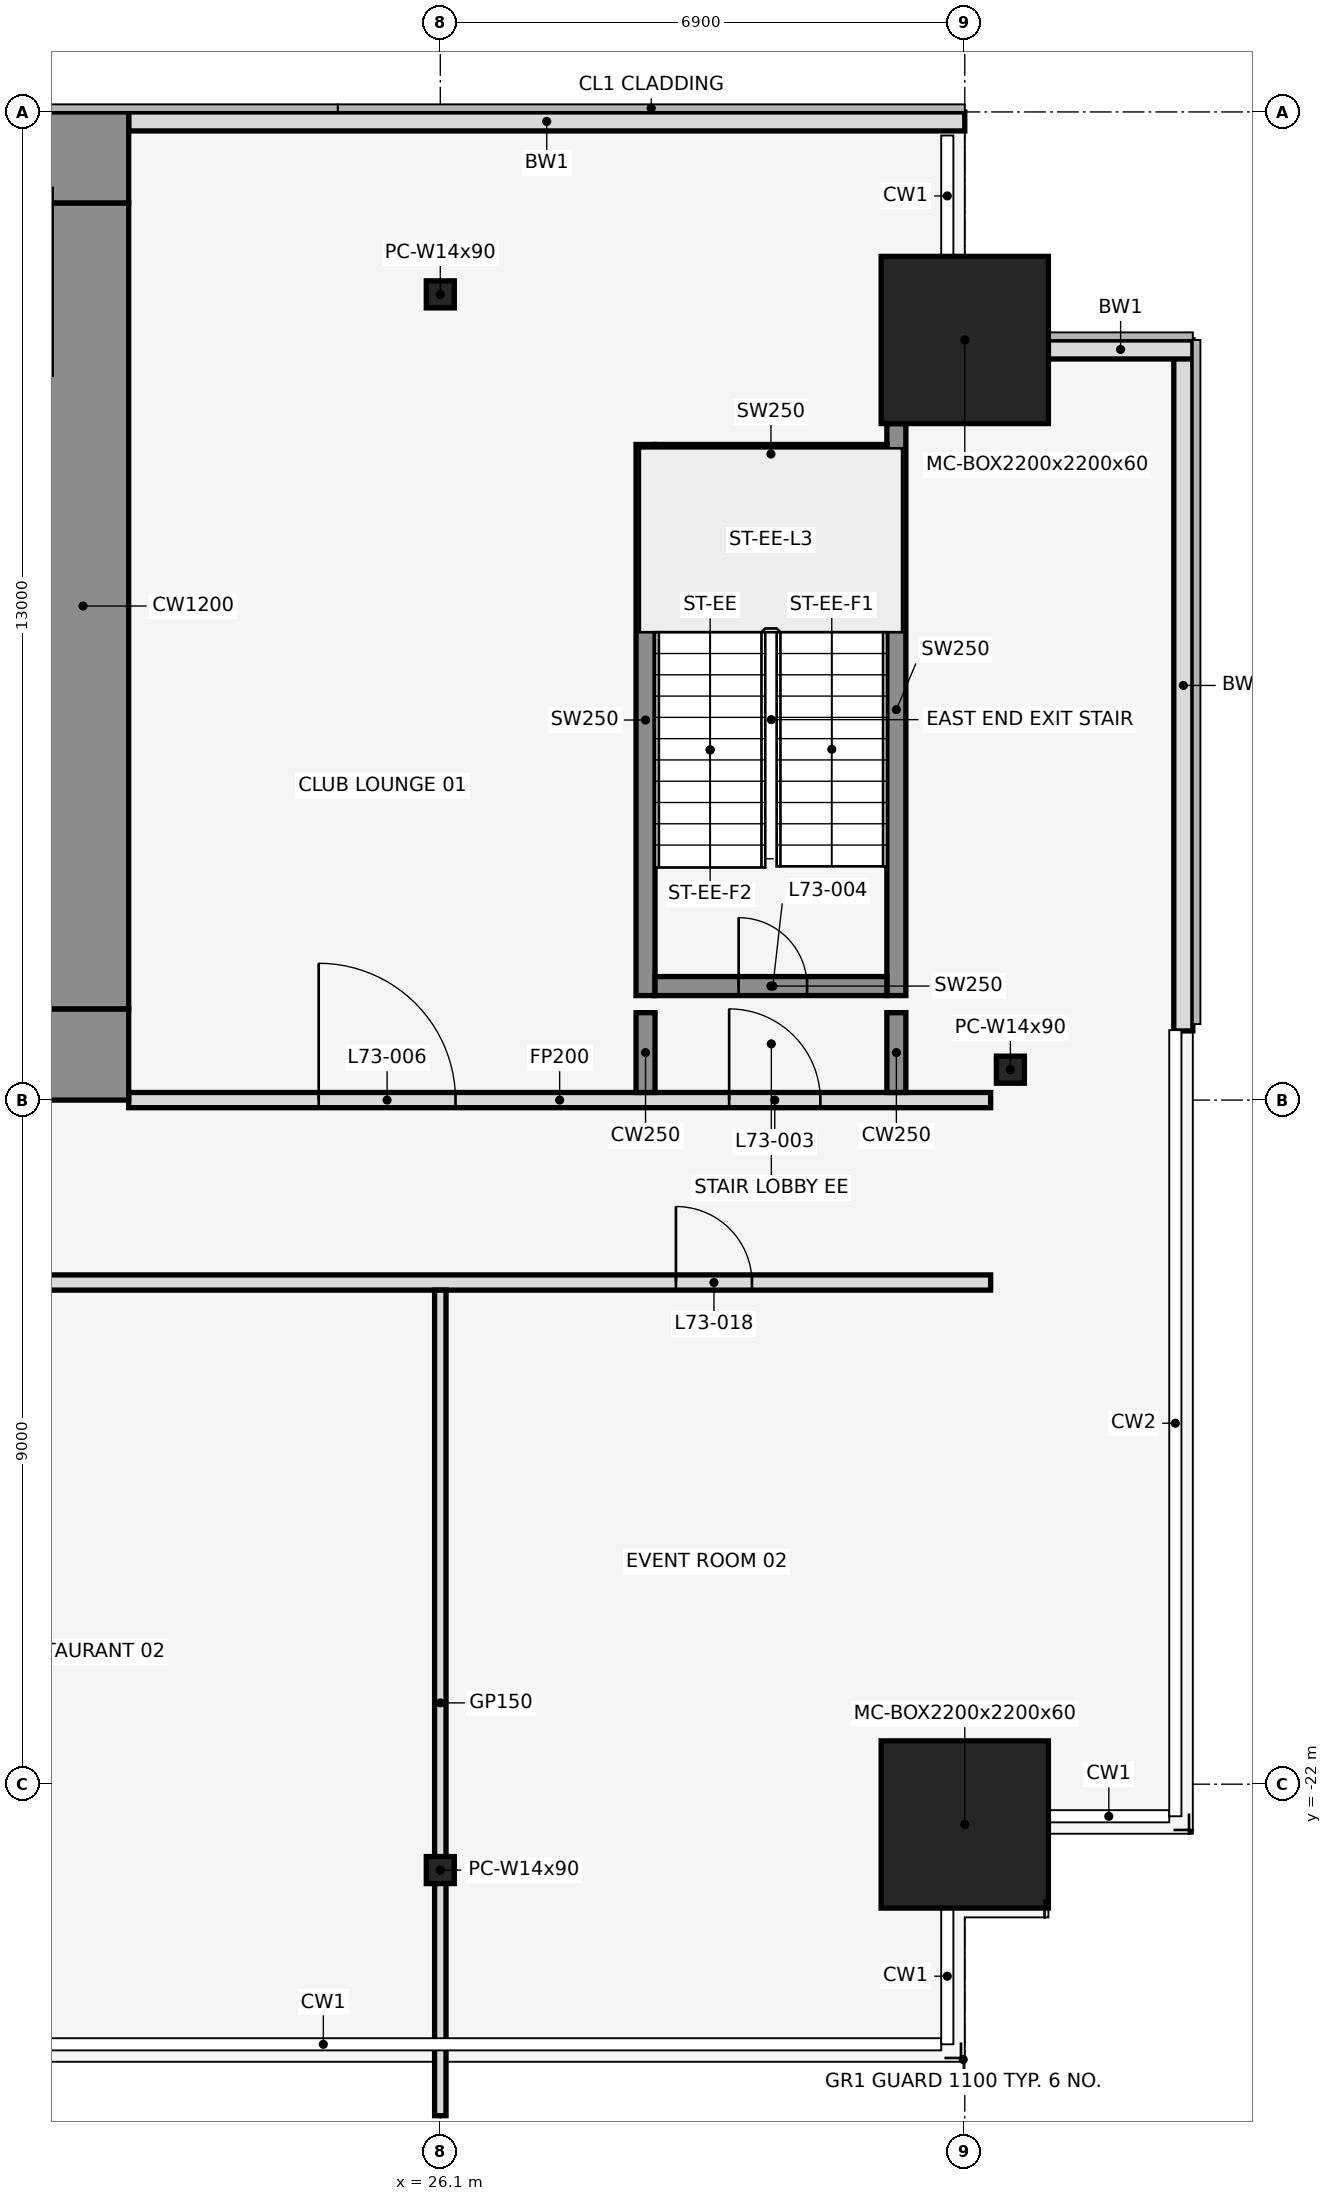
"""IFC4 building model, lengths in metres.
Left out: names, types, materials, properties, quantities, classifications, styles, units other than length and angle.
Written with IfcOpenShell. Run it as: python <this file> out.ifc"""

import sys

from ifc_helpers import new_model, si_unit, direction, frame, frame_2d, origin, origin_2d, place, context, subcontext, project, spatial, rectangle, hollow_rectangle, i_section, extrude, element, fill, save


model = new_model("IFC4")
c1 = context("Model", 3, precision=1e-05, world=origin(), true_north=direction((0.0, 1.0)))
c2 = subcontext(c1, "Body", "Model", "MODEL_VIEW")
j1 = project(units=[si_unit("LENGTHUNIT", "METRE"), si_unit("PLANEANGLEUNIT", "RADIAN")], contexts=[c1])
p1 = place(None, origin())
s1 = spatial("IfcSite", under=j1, at=p1, CompositionType="ELEMENT")
p2 = place(p1, origin())
s2 = spatial("IfcBuilding", under=s1, at=p2, CompositionType="ELEMENT")
p3 = place(p2, frame((0.0, 0.0, 324.5)))
s3 = spatial("IfcBuildingStorey", under=s2, at=p3, CompositionType="ELEMENT", Elevation=324.5)
for number, where, z_axis, x_axis in (
    (1, (26.1, -23.13, 0.0), (0.0, 0.0, 1.0), (1.0, 0.0, 0.0)),
    (2, (26.1, -2.4, 0.0), (0.0, 0.0, 1.0), (1.0, 0.0, 0.0)),
):
    element("IfcColumn", number, at=place(p3, frame(where, z_axis=z_axis, x_axis=x_axis)), inside=s3, PredefinedType="COLUMN", context=c2, shape_type="SweptSolid", body=[
        extrude(i_section(OverallWidth=0.368, OverallDepth=0.356, WebThickness=0.011, FlangeThickness=0.018, at=origin_2d()), origin(), (0.0, 0.0, 1.0), 4.5),
    ])
for number, where, z_axis, x_axis in (
    (3, (33.0, -22.53, 0.0), (0.0, 0.0, 1.0), (1.0, 0.0, 0.0)),
    (4, (33.0, -3.0, 0.0), (0.0, 0.0, 1.0), (1.0, 0.0, 0.0)),
):
    element("IfcColumn", number, at=place(p3, frame(where, z_axis=z_axis, x_axis=x_axis)), inside=s3, PredefinedType="COLUMN", context=c2, shape_type="SweptSolid", body=[
        extrude(hollow_rectangle(XDim=2.2, YDim=2.2, WallThickness=0.06, at=origin_2d()), origin(), (0.0, 0.0, 1.0), 4.5),
    ])
p4 = place(p3, frame((33.6, -12.6, 0.0), z_axis=(0.0, 0.0, 1.0), x_axis=(1.0, 0.0, 0.0)))
e5 = element("IfcColumn", 5, at=p4, inside=s3, PredefinedType="COLUMN", context=c2, shape_type="SweptSolid", body=[
    extrude(i_section(OverallWidth=0.368, OverallDepth=0.356, WebThickness=0.011, FlangeThickness=0.018, at=origin_2d()), origin(), (0.0, 0.0, 1.0), 4.5),
])
p5 = place(p3, frame((33.0, -0.125, 0.0), z_axis=(0.0, 0.0, 1.0), x_axis=(-1.0, 0.0, 0.0)))
e6 = element("IfcWall", 6, at=p5, inside=s3, PredefinedType="STANDARD", context=c2, shape_type="SweptSolid", body=[
    extrude(rectangle(XDim=11.0, YDim=0.25, at=frame_2d((5.5, 0.0))), origin(), (0.0, 0.0, 1.0), 4.35),
])
p6 = place(p3, frame((35.875, -12.09, 0.0), z_axis=(0.0, 0.0, 1.0), x_axis=(0.0, 1.0, 0.0)))
e7 = element("IfcWall", 7, at=p6, inside=s3, PredefinedType="STANDARD", context=c2, shape_type="SweptSolid", body=[
    extrude(rectangle(XDim=9.09, YDim=0.25, at=frame_2d((4.545, 0.0))), origin(), (0.0, 0.0, 1.0), 4.35),
])
p7 = place(p3, frame((36.0, -3.125, 0.0), z_axis=(0.0, 0.0, 1.0), x_axis=(-1.0, 0.0, 0.0)))
e8 = element("IfcWall", 8, at=p7, inside=s3, PredefinedType="STANDARD", context=c2, shape_type="SweptSolid", body=[
    extrude(rectangle(XDim=1.9, YDim=0.25, at=frame_2d((0.95, 0.0))), origin(), (0.0, 0.0, 1.0), 4.35),
])
p8 = place(p3, frame((28.8, -11.625, 0.0), z_axis=(0.0, 0.0, 1.0), x_axis=(0.0, 1.0, 0.0)))
e9 = element("IfcWall", 9, at=p8, inside=s3, PredefinedType="SHEAR", context=c2, shape_type="SweptSolid", body=[
    extrude(rectangle(XDim=7.25, YDim=0.25, at=frame_2d((3.625, 0.0))), origin(), (0.0, 0.0, 1.0), 4.5),
])
p9 = place(p3, frame((32.1, -11.625, 0.0), z_axis=(0.0, 0.0, 1.0), x_axis=(0.0, 1.0, 0.0)))
e10 = element("IfcWall", 10, at=p9, inside=s3, PredefinedType="SHEAR", context=c2, shape_type="SweptSolid", body=[
    extrude(rectangle(XDim=7.525, YDim=0.25, at=frame_2d((3.762, 0.0))), origin(), (0.0, 0.0, 1.0), 4.5),
])
p10 = place(p3, frame((28.925, -11.5, 0.0), z_axis=(0.0, 0.0, 1.0), x_axis=(1.0, 0.0, 0.0)))
e11 = element("IfcWall", 11, at=p10, inside=s3, PredefinedType="SHEAR", context=c2, shape_type="SweptSolid", body=[
    extrude(rectangle(XDim=3.05, YDim=0.25, at=frame_2d((1.525, 0.0))), origin(), (0.0, 0.0, 1.0), 4.5),
])
p11 = place(p10, frame((1.1, 0.0, 0.0)))
e12 = element("IfcOpeningElement", 12, at=p11, cuts=e11, PredefinedType="OPENING", context=c2, shape_type="SweptSolid", body=[
    extrude(rectangle(XDim=0.9, YDim=2.1, at=frame_2d((0.45, 1.05))), frame((0.0, 0.137, 0.0), z_axis=(0.0, -1.0, 0.0), x_axis=(1.0, 0.0, 0.0)), (0.0, 0.0, 1.0), 0.274),
])
p12 = place(p3, frame((28.925, -4.5, 0.0), z_axis=(0.0, 0.0, 1.0), x_axis=(1.0, 0.0, 0.0)))
e13 = element("IfcWall", 13, at=p12, inside=s3, PredefinedType="SHEAR", context=c2, shape_type="SweptSolid", body=[
    extrude(rectangle(XDim=3.05, YDim=0.25, at=frame_2d((1.525, 0.0))), origin(), (0.0, 0.0, 1.0), 4.5),
])
p13 = place(p3, frame((1.4, -15.4, 0.0), z_axis=(0.0, 0.0, 1.0), x_axis=(1.0, 0.0, 0.0)))
e14 = element("IfcWall", 14, at=p13, inside=s3, PredefinedType="PARTITIONING", context=c2, shape_type="SweptSolid", body=[
    extrude(rectangle(XDim=31.94, YDim=0.2, at=frame_2d((15.97, 0.0))), origin(), (0.0, 0.0, 1.0), 3.418),
])
p14 = place(p13, frame((3.2, 0.0, 0.0)))
e15 = element("IfcOpeningElement", 15, at=p14, cuts=e14, PredefinedType="OPENING", context=c2, shape_type="SweptSolid", body=[
    extrude(rectangle(XDim=1.0, YDim=2.1, at=frame_2d((0.5, 1.05))), frame((0.0, 0.112, 0.0), z_axis=(0.0, -1.0, 0.0), x_axis=(1.0, 0.0, 0.0)), (0.0, 0.0, 1.0), 0.224),
])
p15 = place(p13, frame((9.7, 0.0, 0.0)))
e16 = element("IfcOpeningElement", 16, at=p15, cuts=e14, PredefinedType="OPENING", context=c2, shape_type="SweptSolid", body=[
    extrude(rectangle(XDim=1.0, YDim=2.1, at=frame_2d((0.5, 1.05))), frame((0.0, 0.112, 0.0), z_axis=(0.0, -1.0, 0.0), x_axis=(1.0, 0.0, 0.0)), (0.0, 0.0, 1.0), 0.224),
])
p16 = place(p13, frame((18.4, 0.0, 0.0)))
e17 = element("IfcOpeningElement", 17, at=p16, cuts=e14, PredefinedType="OPENING", context=c2, shape_type="SweptSolid", body=[
    extrude(rectangle(XDim=1.0, YDim=2.1, at=frame_2d((0.5, 1.05))), frame((0.0, 0.112, 0.0), z_axis=(0.0, -1.0, 0.0), x_axis=(1.0, 0.0, 0.0)), (0.0, 0.0, 1.0), 0.224),
])
p17 = place(p13, frame((27.8, 0.0, 0.0)))
e18 = element("IfcOpeningElement", 18, at=p17, cuts=e14, PredefinedType="OPENING", context=c2, shape_type="SweptSolid", body=[
    extrude(rectangle(XDim=1.0, YDim=2.1, at=frame_2d((0.5, 1.05))), frame((0.0, 0.112, 0.0), z_axis=(0.0, -1.0, 0.0), x_axis=(1.0, 0.0, 0.0)), (0.0, 0.0, 1.0), 0.224),
])
p18 = place(p3, frame((22.0, -13.0, 0.0), z_axis=(0.0, 0.0, 1.0), x_axis=(1.0, 0.0, 0.0)))
e19 = element("IfcWall", 19, at=p18, inside=s3, PredefinedType="PARTITIONING", context=c2, shape_type="SweptSolid", body=[
    extrude(rectangle(XDim=11.34, YDim=0.2, at=frame_2d((5.67, 0.0))), origin(), (0.0, 0.0, 1.0), 3.418),
])
p19 = place(p18, frame((7.9, 0.0, 0.0)))
e20 = element("IfcOpeningElement", 20, at=p19, cuts=e19, PredefinedType="OPENING", context=c2, shape_type="SweptSolid", body=[
    extrude(rectangle(XDim=1.2, YDim=2.1, at=frame_2d((0.6, 1.05))), frame((0.0, 0.112, 0.0), z_axis=(0.0, -1.0, 0.0), x_axis=(1.0, 0.0, 0.0)), (0.0, 0.0, 1.0), 0.224),
])
p20 = place(p18, frame((2.5, 0.0, 0.0)))
e21 = element("IfcOpeningElement", 21, at=p20, cuts=e19, PredefinedType="OPENING", context=c2, shape_type="SweptSolid", body=[
    extrude(rectangle(XDim=1.8, YDim=2.1, at=frame_2d((0.9, 1.05))), frame((0.0, 0.112, 0.0), z_axis=(0.0, -1.0, 0.0), x_axis=(1.0, 0.0, 0.0)), (0.0, 0.0, 1.0), 0.224),
])
p21 = place(p3, frame((26.1, -26.361, 0.0), z_axis=(0.0, 0.0, 1.0), x_axis=(0.0, 1.0, 0.0)))
e22 = element("IfcWall", 22, at=p21, inside=s3, PredefinedType="PARTITIONING", context=c2, shape_type="SweptSolid", body=[
    extrude(rectangle(XDim=10.861, YDim=0.15, at=frame_2d((5.431, 0.0))), origin(), (0.0, 0.0, 1.0), 3.418),
])
for number, where, z_axis, x_axis in (
    (23, (28.8, -12.9, 0.0), (0.0, 0.0, 1.0), (0.0, 1.0, 0.0)),
    (24, (32.1, -12.9, 0.0), (0.0, 0.0, 1.0), (0.0, 1.0, 0.0)),
):
    element("IfcWall", number, at=place(p3, frame(where, z_axis=z_axis, x_axis=x_axis)), inside=s3, PredefinedType="SHEAR", context=c2, shape_type="SweptSolid", body=[
        extrude(rectangle(XDim=1.05, YDim=0.25, at=frame_2d((0.525, 0.0))), origin(), (0.0, 0.0, 1.0), 4.5),
    ])
p22 = place(p3, frame((-22.0, -0.6, 0.0), z_axis=(0.0, 0.0, 1.0), x_axis=(1.0, 0.0, 0.0)))
e25 = element("IfcWall", 25, at=p22, inside=s3, PredefinedType="SHEAR", context=c2, shape_type="SweptSolid", body=[
    extrude(rectangle(XDim=44.0, YDim=1.2, at=frame_2d((22.0, 0.0))), origin(), (0.0, 0.0, 1.0), 4.5),
])
p23 = place(p22, frame((18.55, 0.0, 0.0)))
e26 = element("IfcOpeningElement", 26, at=p23, cuts=e25, PredefinedType="OPENING", context=c2, shape_type="SweptSolid", body=[
    extrude(rectangle(XDim=0.9, YDim=2.1, at=frame_2d((0.45, 1.05))), frame((0.0, 0.612, 0.0), z_axis=(0.0, -1.0, 0.0), x_axis=(1.0, 0.0, 0.0)), (0.0, 0.0, 1.0), 1.224),
])
p24 = place(p22, frame((24.55, 0.0, 0.0)))
e27 = element("IfcOpeningElement", 27, at=p24, cuts=e25, PredefinedType="OPENING", context=c2, shape_type="SweptSolid", body=[
    extrude(rectangle(XDim=0.9, YDim=2.1, at=frame_2d((0.45, 1.05))), frame((0.0, 0.612, 0.0), z_axis=(0.0, -1.0, 0.0), x_axis=(1.0, 0.0, 0.0)), (0.0, 0.0, 1.0), 1.224),
])
p25 = place(p3, frame((-22.0, -12.4, 0.0), z_axis=(0.0, 0.0, 1.0), x_axis=(1.0, 0.0, 0.0)))
e28 = element("IfcWall", 28, at=p25, inside=s3, PredefinedType="SHEAR", context=c2, shape_type="SweptSolid", body=[
    extrude(rectangle(XDim=44.0, YDim=1.2, at=frame_2d((22.0, 0.0))), origin(), (0.0, 0.0, 1.0), 4.5),
])
p26 = place(p25, frame((2.2, 0.0, 0.0)))
e29 = element("IfcOpeningElement", 29, at=p26, cuts=e28, PredefinedType="OPENING", context=c2, shape_type="SweptSolid", body=[
    extrude(rectangle(XDim=1.2, YDim=2.1, at=frame_2d((0.6, 1.05))), frame((0.0, 0.612, 0.0), z_axis=(0.0, -1.0, 0.0), x_axis=(1.0, 0.0, 0.0)), (0.0, 0.0, 1.0), 1.224),
])
p27 = place(p25, frame((21.4, 0.0, 0.0)))
e30 = element("IfcOpeningElement", 30, at=p27, cuts=e28, PredefinedType="OPENING", context=c2, shape_type="SweptSolid", body=[
    extrude(rectangle(XDim=1.2, YDim=2.1, at=frame_2d((0.6, 1.05))), frame((0.0, 0.612, 0.0), z_axis=(0.0, -1.0, 0.0), x_axis=(1.0, 0.0, 0.0)), (0.0, 0.0, 1.0), 1.224),
])
p28 = place(p25, frame((40.6, 0.0, 0.0)))
e31 = element("IfcOpeningElement", 31, at=p28, cuts=e28, PredefinedType="OPENING", context=c2, shape_type="SweptSolid", body=[
    extrude(rectangle(XDim=1.2, YDim=2.1, at=frame_2d((0.6, 1.05))), frame((0.0, 0.612, 0.0), z_axis=(0.0, -1.0, 0.0), x_axis=(1.0, 0.0, 0.0)), (0.0, 0.0, 1.0), 1.224),
])
p29 = place(p25, frame((16.0, 0.0, 0.0)))
e32 = element("IfcOpeningElement", 32, at=p29, cuts=e28, PredefinedType="OPENING", context=c2, shape_type="SweptSolid", body=[
    extrude(rectangle(XDim=1.8, YDim=2.1, at=frame_2d((0.9, 1.05))), frame((0.0, 0.612, 0.0), z_axis=(0.0, -1.0, 0.0), x_axis=(1.0, 0.0, 0.0)), (0.0, 0.0, 1.0), 1.224),
])
p30 = place(p25, frame((6.3, 0.0, 0.0)))
e33 = element("IfcOpeningElement", 33, at=p30, cuts=e28, PredefinedType="OPENING", context=c2, shape_type="SweptSolid", body=[
    extrude(rectangle(XDim=1.2, YDim=2.1, at=frame_2d((0.6, 1.05))), frame((0.0, 0.612, 0.0), z_axis=(0.0, -1.0, 0.0), x_axis=(1.0, 0.0, 0.0)), (0.0, 0.0, 1.0), 1.224),
])
p31 = place(p25, frame((26.2, 0.0, 0.0)))
e34 = element("IfcOpeningElement", 34, at=p31, cuts=e28, PredefinedType="OPENING", context=c2, shape_type="SweptSolid", body=[
    extrude(rectangle(XDim=1.8, YDim=2.1, at=frame_2d((0.9, 1.05))), frame((0.0, 0.612, 0.0), z_axis=(0.0, -1.0, 0.0), x_axis=(1.0, 0.0, 0.0)), (0.0, 0.0, 1.0), 1.224),
])
p32 = place(p25, frame((36.5, 0.0, 0.0)))
e35 = element("IfcOpeningElement", 35, at=p32, cuts=e28, PredefinedType="OPENING", context=c2, shape_type="SweptSolid", body=[
    extrude(rectangle(XDim=1.2, YDim=2.1, at=frame_2d((0.6, 1.05))), frame((0.0, 0.612, 0.0), z_axis=(0.0, -1.0, 0.0), x_axis=(1.0, 0.0, 0.0)), (0.0, 0.0, 1.0), 1.224),
])
p33 = place(p3, frame((21.4, -11.8, 0.0), z_axis=(0.0, 0.0, 1.0), x_axis=(0.0, 1.0, 0.0)))
e36 = element("IfcWall", 36, at=p33, inside=s3, PredefinedType="SHEAR", context=c2, shape_type="SweptSolid", body=[
    extrude(rectangle(XDim=10.6, YDim=1.2, at=frame_2d((5.3, 0.0))), origin(), (0.0, 0.0, 1.0), 4.5),
])
p34 = place(p19, origin())
e37 = element("IfcDoor", 37, at=p34, inside=s3, OperationType="SINGLE_SWING_RIGHT", PredefinedType="DOOR", context=c2, shape_type="SweptSolid", body=[
    extrude(rectangle(XDim=1.2, YDim=2.1, at=frame_2d((0.6, 1.05))), frame((0.0, 0.025, 0.0), z_axis=(0.0, -1.0, 0.0), x_axis=(1.0, 0.0, 0.0)), (0.0, 0.0, 1.0), 0.05),
])
fill(e20, e37)
p35 = place(p11, origin())
e38 = element("IfcDoor", 38, at=p35, inside=s3, OperationType="SINGLE_SWING_LEFT", PredefinedType="DOOR", context=c2, shape_type="SweptSolid", body=[
    extrude(rectangle(XDim=0.9, YDim=2.1, at=frame_2d((0.45, 1.05))), frame((0.0, 0.025, 0.0), z_axis=(0.0, -1.0, 0.0), x_axis=(1.0, 0.0, 0.0)), (0.0, 0.0, 1.0), 0.05),
])
fill(e12, e38)
p36 = place(p20, origin())
e39 = element("IfcDoor", 39, at=p36, inside=s3, OperationType="SINGLE_SWING_LEFT", PredefinedType="DOOR", context=c2, shape_type="SweptSolid", body=[
    extrude(rectangle(XDim=1.8, YDim=2.1, at=frame_2d((0.9, 1.05))), frame((0.0, 0.025, 0.0), z_axis=(0.0, -1.0, 0.0), x_axis=(1.0, 0.0, 0.0)), (0.0, 0.0, 1.0), 0.05),
])
fill(e21, e39)
p37 = place(p17, frame((1.0, 0.0, 0.0), z_axis=(0.0, 0.0, 1.0), x_axis=(-1.0, 0.0, 0.0)))
e40 = element("IfcDoor", 40, at=p37, inside=s3, OperationType="SINGLE_SWING_RIGHT", PredefinedType="DOOR", context=c2, shape_type="SweptSolid", body=[
    extrude(rectangle(XDim=1.0, YDim=2.1, at=frame_2d((0.5, 1.05))), frame((0.0, 0.025, 0.0), z_axis=(0.0, -1.0, 0.0), x_axis=(1.0, 0.0, 0.0)), (0.0, 0.0, 1.0), 0.05),
])
fill(e18, e40)
save(model, sys.argv[1])
